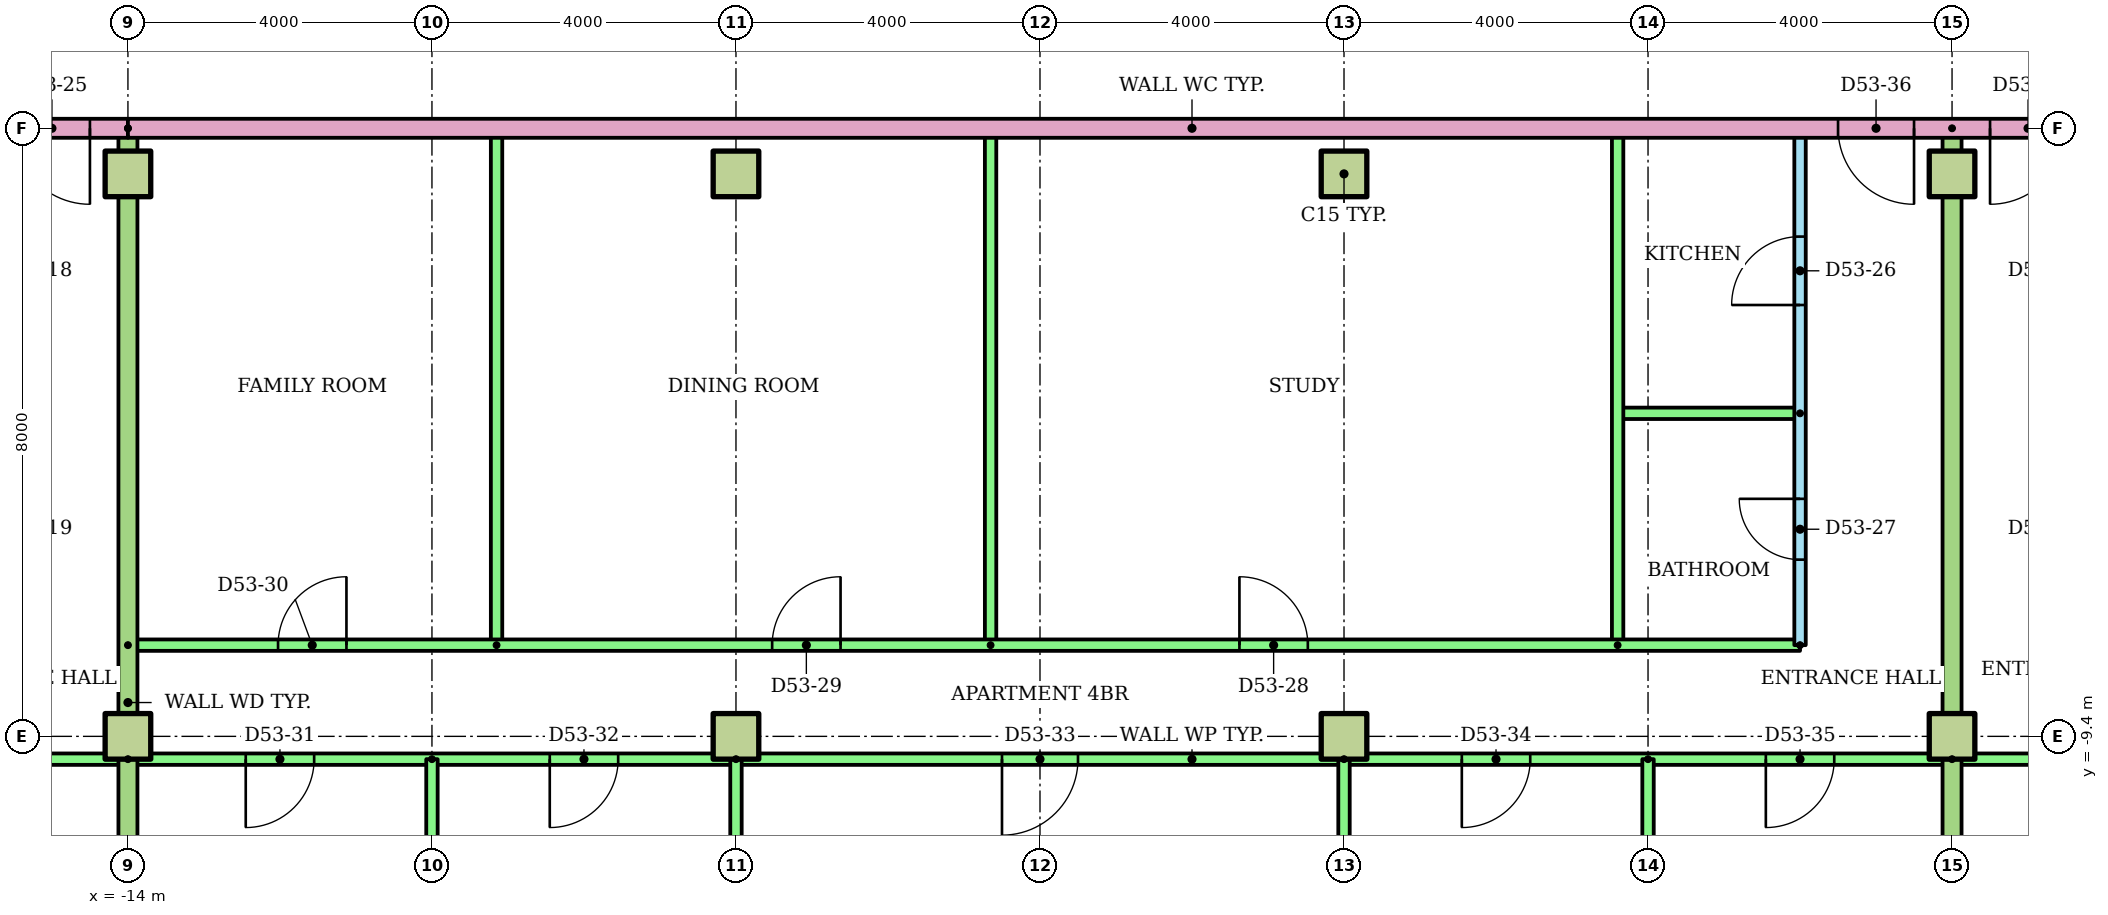
"""IFC4 building model, lengths in metres.
Left out: names, types, materials, properties, quantities, classifications, styles, units other than length and angle.
Written with IfcOpenShell. Run it as: python <this file> out.ifc"""

import sys

from ifc_helpers import new_model, si_unit, direction, frame, frame_2d, origin, origin_2d, place, context, subcontext, project, spatial, rectangle, extrude, element, fill, save


model = new_model("IFC4")
c1 = context("Model", 3, precision=1e-05, world=origin(), true_north=direction((0.0, 1.0)))
c2 = subcontext(c1, "Body", "Model", "MODEL_VIEW")
j1 = project(units=[si_unit("LENGTHUNIT", "METRE"), si_unit("PLANEANGLEUNIT", "RADIAN")], contexts=[c1])
p1 = place(None, origin())
s1 = spatial("IfcSite", under=j1, at=p1, CompositionType="ELEMENT")
p2 = place(p1, origin())
s2 = spatial("IfcBuilding", under=s1, at=p2, CompositionType="ELEMENT")
p3 = place(p2, frame((0.0, 0.0, 207.6)))
s3 = spatial("IfcBuildingStorey", under=s2, at=p3, CompositionType="ELEMENT", Elevation=207.6)
for number, where in (
    (1, (-14.0, -9.4, 0.0)),
    (2, (-6.0, -9.4, 0.0)),
    (3, (2.0, -9.4, 0.0)),
    (4, (10.0, -9.4, 0.0)),
    (5, (-14.0, -2.0, 0.0)),
    (6, (-6.0, -2.0, 0.0)),
    (7, (2.0, -2.0, 0.0)),
    (8, (10.0, -2.0, 0.0)),
):
    element("IfcColumn", number, at=place(p3, frame(where)), inside=s3, PredefinedType="COLUMN", context=c2, shape_type="SweptSolid", body=[
        extrude(rectangle(XDim=0.6, YDim=0.6, at=origin_2d()), origin(), (0.0, 0.0, 1.0), 3.2),
    ])
p4 = place(p3, frame((-14.0, -9.7, 0.0), z_axis=(0.0, 0.0, 1.0), x_axis=(-1.0, 0.0, 0.0)))
e9 = element("IfcWall", 9, at=p4, inside=s3, PredefinedType="PARTITIONING", context=c2, shape_type="SweptSolid", body=[
    extrude(rectangle(XDim=14.92, YDim=0.15, at=frame_2d((7.46, 0.0))), origin(), (0.0, 0.0, 1.0), 2.4),
])
p5 = place(p4, frame((12.0, 0.0, 0.0)))
e10 = element("IfcOpeningElement", 10, at=p5, cuts=e9, PredefinedType="OPENING", context=c2, shape_type="SweptSolid", body=[
    extrude(rectangle(XDim=0.9, YDim=2.1, at=frame_2d((0.45, 1.05))), frame((0.0, 0.085, 0.0), z_axis=(0.0, -1.0, 0.0), x_axis=(1.0, 0.0, 0.0)), (0.0, 0.0, 1.0), 0.17),
])
p6 = place(p4, frame((6.624, 0.0, 0.0)))
e11 = element("IfcOpeningElement", 11, at=p6, cuts=e9, PredefinedType="OPENING", context=c2, shape_type="SweptSolid", body=[
    extrude(rectangle(XDim=0.9, YDim=2.1, at=frame_2d((0.45, 1.05))), frame((0.0, 0.085, 0.0), z_axis=(0.0, -1.0, 0.0), x_axis=(1.0, 0.0, 0.0)), (0.0, 0.0, 1.0), 0.17),
])
p7 = place(p4, frame((1.5, 0.0, 0.0)))
e12 = element("IfcOpeningElement", 12, at=p7, cuts=e9, PredefinedType="OPENING", context=c2, shape_type="SweptSolid", body=[
    extrude(rectangle(XDim=1.0, YDim=2.1, at=frame_2d((0.5, 1.05))), frame((0.0, 0.085, 0.0), z_axis=(0.0, -1.0, 0.0), x_axis=(1.0, 0.0, 0.0)), (0.0, 0.0, 1.0), 0.17),
])
p8 = place(p3, frame((8.0, -8.2, 0.0), z_axis=(0.0, 0.0, 1.0), x_axis=(0.0, 1.0, 0.0)))
e13 = element("IfcWall", 13, at=p8, inside=s3, PredefinedType="PARTITIONING", context=c2, shape_type="SweptSolid", body=[
    extrude(rectangle(XDim=6.8, YDim=0.15, at=frame_2d((3.4, 0.0))), origin(), (0.0, 0.0, 1.0), 2.4),
])
p9 = place(p8, frame((4.475, 0.0, 0.0)))
e14 = element("IfcOpeningElement", 14, at=p9, cuts=e13, PredefinedType="OPENING", context=c2, shape_type="SweptSolid", body=[
    extrude(rectangle(XDim=0.9, YDim=2.1, at=frame_2d((0.45, 1.05))), frame((0.0, 0.085, 0.0), z_axis=(0.0, -1.0, 0.0), x_axis=(1.0, 0.0, 0.0)), (0.0, 0.0, 1.0), 0.17),
])
p10 = place(p8, frame((1.125, 0.0, 0.0)))
e15 = element("IfcOpeningElement", 15, at=p10, cuts=e13, PredefinedType="OPENING", context=c2, shape_type="SweptSolid", body=[
    extrude(rectangle(XDim=0.8, YDim=2.1, at=frame_2d((0.4, 1.05))), frame((0.0, 0.085, 0.0), z_axis=(0.0, -1.0, 0.0), x_axis=(1.0, 0.0, 0.0)), (0.0, 0.0, 1.0), 0.17),
])
p11 = place(p3, frame((8.0, -5.15, 0.0), z_axis=(0.0, 0.0, 1.0), x_axis=(-1.0, 0.0, 0.0)))
e16 = element("IfcWall", 16, at=p11, inside=s3, PredefinedType="PARTITIONING", context=c2, shape_type="SweptSolid", body=[
    extrude(rectangle(XDim=2.4, YDim=0.15, at=frame_2d((1.2, 0.0))), origin(), (0.0, 0.0, 1.0), 2.4),
])
for number, where, z_axis, x_axis in (
    (17, (5.6, -8.2, 0.0), (0.0, 0.0, 1.0), (0.0, 1.0, 0.0)),
    (18, (-2.65, -8.2, 0.0), (0.0, 0.0, 1.0), (0.0, 1.0, 0.0)),
    (19, (-9.15, -8.2, 0.0), (0.0, 0.0, 1.0), (0.0, 1.0, 0.0)),
):
    element("IfcWall", number, at=place(p3, frame(where, z_axis=z_axis, x_axis=x_axis)), inside=s3, PredefinedType="PARTITIONING", context=c2, shape_type="SweptSolid", body=[
        extrude(rectangle(XDim=6.8, YDim=0.15, at=frame_2d((3.4, 0.0))), origin(), (0.0, 0.0, 1.0), 2.4),
    ])
p12 = place(p3, frame((-14.0, -8.2, 0.0)))
e20 = element("IfcWall", 20, at=p12, inside=s3, PredefinedType="PARTITIONING", context=c2, shape_type="SweptSolid", body=[
    extrude(rectangle(XDim=22.0, YDim=0.15, at=frame_2d((11.0, 0.0))), origin(), (0.0, 0.0, 1.0), 2.4),
])
p13 = place(p12, frame((14.624, 0.0, 0.0)))
e21 = element("IfcOpeningElement", 21, at=p13, cuts=e20, PredefinedType="OPENING", context=c2, shape_type="SweptSolid", body=[
    extrude(rectangle(XDim=0.9, YDim=2.1, at=frame_2d((0.45, 1.05))), frame((0.0, 0.085, 0.0), z_axis=(0.0, -1.0, 0.0), x_axis=(1.0, 0.0, 0.0)), (0.0, 0.0, 1.0), 0.17),
])
p14 = place(p12, frame((8.476, 0.0, 0.0)))
e22 = element("IfcOpeningElement", 22, at=p14, cuts=e20, PredefinedType="OPENING", context=c2, shape_type="SweptSolid", body=[
    extrude(rectangle(XDim=0.9, YDim=2.1, at=frame_2d((0.45, 1.05))), frame((0.0, 0.085, 0.0), z_axis=(0.0, -1.0, 0.0), x_axis=(1.0, 0.0, 0.0)), (0.0, 0.0, 1.0), 0.17),
])
p15 = place(p12, frame((1.975, 0.0, 0.0)))
e23 = element("IfcOpeningElement", 23, at=p15, cuts=e20, PredefinedType="OPENING", context=c2, shape_type="SweptSolid", body=[
    extrude(rectangle(XDim=0.9, YDim=2.1, at=frame_2d((0.45, 1.05))), frame((0.0, 0.085, 0.0), z_axis=(0.0, -1.0, 0.0), x_axis=(1.0, 0.0, 0.0)), (0.0, 0.0, 1.0), 0.17),
])
p16 = place(p3, frame((10.0, -9.7, 0.0), z_axis=(0.0, 0.0, 1.0), x_axis=(-1.0, 0.0, 0.0)))
e24 = element("IfcWall", 24, at=p16, inside=s3, PredefinedType="PARTITIONING", context=c2, shape_type="SweptSolid", body=[
    extrude(rectangle(XDim=24.0, YDim=0.15, at=frame_2d((12.0, 0.0))), origin(), (0.0, 0.0, 1.0), 2.4),
])
p17 = place(p16, frame((21.55, 0.0, 0.0)))
e25 = element("IfcOpeningElement", 25, at=p17, cuts=e24, PredefinedType="OPENING", context=c2, shape_type="SweptSolid", body=[
    extrude(rectangle(XDim=0.9, YDim=2.1, at=frame_2d((0.45, 1.05))), frame((0.0, 0.085, 0.0), z_axis=(0.0, -1.0, 0.0), x_axis=(1.0, 0.0, 0.0)), (0.0, 0.0, 1.0), 0.17),
])
p18 = place(p16, frame((17.55, 0.0, 0.0)))
e26 = element("IfcOpeningElement", 26, at=p18, cuts=e24, PredefinedType="OPENING", context=c2, shape_type="SweptSolid", body=[
    extrude(rectangle(XDim=0.9, YDim=2.1, at=frame_2d((0.45, 1.05))), frame((0.0, 0.085, 0.0), z_axis=(0.0, -1.0, 0.0), x_axis=(1.0, 0.0, 0.0)), (0.0, 0.0, 1.0), 0.17),
])
p19 = place(p16, frame((11.5, 0.0, 0.0)))
e27 = element("IfcOpeningElement", 27, at=p19, cuts=e24, PredefinedType="OPENING", context=c2, shape_type="SweptSolid", body=[
    extrude(rectangle(XDim=1.0, YDim=2.1, at=frame_2d((0.5, 1.05))), frame((0.0, 0.085, 0.0), z_axis=(0.0, -1.0, 0.0), x_axis=(1.0, 0.0, 0.0)), (0.0, 0.0, 1.0), 0.17),
])
p20 = place(p16, frame((5.55, 0.0, 0.0)))
e28 = element("IfcOpeningElement", 28, at=p20, cuts=e24, PredefinedType="OPENING", context=c2, shape_type="SweptSolid", body=[
    extrude(rectangle(XDim=0.9, YDim=2.1, at=frame_2d((0.45, 1.05))), frame((0.0, 0.085, 0.0), z_axis=(0.0, -1.0, 0.0), x_axis=(1.0, 0.0, 0.0)), (0.0, 0.0, 1.0), 0.17),
])
p21 = place(p16, frame((1.55, 0.0, 0.0)))
e29 = element("IfcOpeningElement", 29, at=p21, cuts=e24, PredefinedType="OPENING", context=c2, shape_type="SweptSolid", body=[
    extrude(rectangle(XDim=0.9, YDim=2.1, at=frame_2d((0.45, 1.05))), frame((0.0, 0.085, 0.0), z_axis=(0.0, -1.0, 0.0), x_axis=(1.0, 0.0, 0.0)), (0.0, 0.0, 1.0), 0.17),
])
p22 = place(p3, frame((-10.0, -9.7, 0.0), z_axis=(0.0, 0.0, 1.0), x_axis=(0.0, -1.0, 0.0)))
e30 = element("IfcWall", 30, at=p22, inside=s3, PredefinedType="PARTITIONING", context=c2, shape_type="SweptSolid", body=[
    extrude(rectangle(XDim=6.821, YDim=0.15, at=frame_2d((3.411, 0.0))), origin(), (0.0, 0.0, 1.0), 2.4),
])
for number, where, z_axis, x_axis in (
    (31, (-6.0, -9.7, 0.0), (0.0, 0.0, 1.0), (0.0, -1.0, 0.0)),
    (32, (2.0, -9.7, 0.0), (0.0, 0.0, 1.0), (0.0, -1.0, 0.0)),
):
    element("IfcWall", number, at=place(p3, frame(where, z_axis=z_axis, x_axis=x_axis)), inside=s3, PredefinedType="PARTITIONING", context=c2, shape_type="SweptSolid", body=[
        extrude(rectangle(XDim=6.81, YDim=0.15, at=frame_2d((3.405, 0.0))), origin(), (0.0, 0.0, 1.0), 2.4),
    ])
p23 = place(p3, frame((6.0, -9.7, 0.0), z_axis=(0.0, 0.0, 1.0), x_axis=(0.0, -1.0, 0.0)))
e33 = element("IfcWall", 33, at=p23, inside=s3, PredefinedType="PARTITIONING", context=c2, shape_type="SweptSolid", body=[
    extrude(rectangle(XDim=6.821, YDim=0.15, at=frame_2d((3.411, 0.0))), origin(), (0.0, 0.0, 1.0), 2.4),
])
p24 = place(p3, frame((-14.0, -1.4, 0.0), z_axis=(0.0, 0.0, 1.0), x_axis=(0.0, -1.0, 0.0)))
e34 = element("IfcWall", 34, at=p24, inside=s3, PredefinedType="PARTITIONING", context=c2, shape_type="SweptSolid", body=[
    extrude(rectangle(XDim=15.11, YDim=0.25, at=frame_2d((7.555, 0.0))), origin(), (0.0, 0.0, 1.0), 2.4),
])
p25 = place(p3, frame((18.0, -9.7, 0.0), z_axis=(0.0, 0.0, 1.0), x_axis=(-1.0, 0.0, 0.0)))
e35 = element("IfcWall", 35, at=p25, inside=s3, PredefinedType="PARTITIONING", context=c2, shape_type="SweptSolid", body=[
    extrude(rectangle(XDim=8.0, YDim=0.15, at=frame_2d((4.0, 0.0))), origin(), (0.0, 0.0, 1.0), 2.4),
])
p26 = place(p25, frame((5.55, 0.0, 0.0)))
e36 = element("IfcOpeningElement", 36, at=p26, cuts=e35, PredefinedType="OPENING", context=c2, shape_type="SweptSolid", body=[
    extrude(rectangle(XDim=0.9, YDim=2.1, at=frame_2d((0.45, 1.05))), frame((0.0, 0.085, 0.0), z_axis=(0.0, -1.0, 0.0), x_axis=(1.0, 0.0, 0.0)), (0.0, 0.0, 1.0), 0.17),
])
p27 = place(p25, frame((1.5, 0.0, 0.0)))
e37 = element("IfcOpeningElement", 37, at=p27, cuts=e35, PredefinedType="OPENING", context=c2, shape_type="SweptSolid", body=[
    extrude(rectangle(XDim=1.0, YDim=2.1, at=frame_2d((0.5, 1.05))), frame((0.0, 0.085, 0.0), z_axis=(0.0, -1.0, 0.0), x_axis=(1.0, 0.0, 0.0)), (0.0, 0.0, 1.0), 0.17),
])
p28 = place(p3, frame((10.0, -1.4, 0.0), z_axis=(0.0, 0.0, 1.0), x_axis=(0.0, -1.0, 0.0)))
e38 = element("IfcWall", 38, at=p28, inside=s3, PredefinedType="PARTITIONING", context=c2, shape_type="SweptSolid", body=[
    extrude(rectangle(XDim=15.11, YDim=0.25, at=frame_2d((7.555, 0.0))), origin(), (0.0, 0.0, 1.0), 2.4),
])
p29 = place(p3, frame((-14.0, -1.4, 0.0), z_axis=(0.0, 0.0, 1.0), x_axis=(-1.0, 0.0, 0.0)))
e39 = element("IfcWall", 39, at=p29, inside=s3, PredefinedType="PARTITIONING", context=c2, shape_type="SweptSolid", body=[
    extrude(rectangle(XDim=14.92, YDim=0.25, at=frame_2d((7.46, 0.0))), origin(), (0.0, 0.0, 1.0), 2.4),
])
p30 = place(p29, frame((0.5, 0.0, 0.0)))
e40 = element("IfcOpeningElement", 40, at=p30, cuts=e39, PredefinedType="OPENING", context=c2, shape_type="SweptSolid", body=[
    extrude(rectangle(XDim=1.0, YDim=2.1, at=frame_2d((0.5, 1.05))), frame((0.0, 0.135, 0.0), z_axis=(0.0, -1.0, 0.0), x_axis=(1.0, 0.0, 0.0)), (0.0, 0.0, 1.0), 0.27),
])
p31 = place(p3, frame((14.0, -1.4, 0.0), z_axis=(0.0, 0.0, 1.0), x_axis=(-1.0, 0.0, 0.0)))
e41 = element("IfcWall", 41, at=p31, inside=s3, PredefinedType="PARTITIONING", context=c2, shape_type="SweptSolid", body=[
    extrude(rectangle(XDim=28.0, YDim=0.25, at=frame_2d((14.0, 0.0))), origin(), (0.0, 0.0, 1.0), 2.4),
])
p32 = place(p31, frame((4.5, 0.0, 0.0)))
e42 = element("IfcOpeningElement", 42, at=p32, cuts=e41, PredefinedType="OPENING", context=c2, shape_type="SweptSolid", body=[
    extrude(rectangle(XDim=1.0, YDim=2.1, at=frame_2d((0.5, 1.05))), frame((0.0, 0.135, 0.0), z_axis=(0.0, -1.0, 0.0), x_axis=(1.0, 0.0, 0.0)), (0.0, 0.0, 1.0), 0.27),
])
p33 = place(p31, frame((2.5, 0.0, 0.0)))
e43 = element("IfcOpeningElement", 43, at=p33, cuts=e41, PredefinedType="OPENING", context=c2, shape_type="SweptSolid", body=[
    extrude(rectangle(XDim=1.0, YDim=2.1, at=frame_2d((0.5, 1.05))), frame((0.0, 0.135, 0.0), z_axis=(0.0, -1.0, 0.0), x_axis=(1.0, 0.0, 0.0)), (0.0, 0.0, 1.0), 0.27),
])
p34 = place(p30, origin())
e44 = element("IfcDoor", 44, at=p34, inside=s3, OperationType="SINGLE_SWING_LEFT", PredefinedType="DOOR", context=c2, shape_type="SweptSolid", body=[
    extrude(rectangle(XDim=1.0, YDim=2.1, at=frame_2d((0.5, 1.05))), frame((0.0, 0.025, 0.0), z_axis=(0.0, -1.0, 0.0), x_axis=(1.0, 0.0, 0.0)), (0.0, 0.0, 1.0), 0.05),
])
fill(e40, e44)
p35 = place(p9, origin())
e45 = element("IfcDoor", 45, at=p35, inside=s3, OperationType="SINGLE_SWING_LEFT", PredefinedType="DOOR", context=c2, shape_type="SweptSolid", body=[
    extrude(rectangle(XDim=0.9, YDim=2.1, at=frame_2d((0.45, 1.05))), frame((0.0, 0.025, 0.0), z_axis=(0.0, -1.0, 0.0), x_axis=(1.0, 0.0, 0.0)), (0.0, 0.0, 1.0), 0.05),
])
fill(e14, e45)
p36 = place(p10, origin())
e46 = element("IfcDoor", 46, at=p36, inside=s3, OperationType="SINGLE_SWING_RIGHT", PredefinedType="DOOR", context=c2, shape_type="SweptSolid", body=[
    extrude(rectangle(XDim=0.8, YDim=2.1, at=frame_2d((0.4, 1.05))), frame((0.0, 0.025, 0.0), z_axis=(0.0, -1.0, 0.0), x_axis=(1.0, 0.0, 0.0)), (0.0, 0.0, 1.0), 0.05),
])
fill(e15, e46)
p37 = place(p13, origin())
e47 = element("IfcDoor", 47, at=p37, inside=s3, OperationType="SINGLE_SWING_LEFT", PredefinedType="DOOR", context=c2, shape_type="SweptSolid", body=[
    extrude(rectangle(XDim=0.9, YDim=2.1, at=frame_2d((0.45, 1.05))), frame((0.0, 0.025, 0.0), z_axis=(0.0, -1.0, 0.0), x_axis=(1.0, 0.0, 0.0)), (0.0, 0.0, 1.0), 0.05),
])
fill(e21, e47)
p38 = place(p14, origin())
e48 = element("IfcDoor", 48, at=p38, inside=s3, OperationType="SINGLE_SWING_RIGHT", PredefinedType="DOOR", context=c2, shape_type="SweptSolid", body=[
    extrude(rectangle(XDim=0.9, YDim=2.1, at=frame_2d((0.45, 1.05))), frame((0.0, 0.025, 0.0), z_axis=(0.0, -1.0, 0.0), x_axis=(1.0, 0.0, 0.0)), (0.0, 0.0, 1.0), 0.05),
])
fill(e22, e48)
p39 = place(p15, origin())
e49 = element("IfcDoor", 49, at=p39, inside=s3, OperationType="SINGLE_SWING_RIGHT", PredefinedType="DOOR", context=c2, shape_type="SweptSolid", body=[
    extrude(rectangle(XDim=0.9, YDim=2.1, at=frame_2d((0.45, 1.05))), frame((0.0, 0.025, 0.0), z_axis=(0.0, -1.0, 0.0), x_axis=(1.0, 0.0, 0.0)), (0.0, 0.0, 1.0), 0.05),
])
fill(e23, e49)
p40 = place(p17, origin())
e50 = element("IfcDoor", 50, at=p40, inside=s3, OperationType="SINGLE_SWING_RIGHT", PredefinedType="DOOR", context=c2, shape_type="SweptSolid", body=[
    extrude(rectangle(XDim=0.9, YDim=2.1, at=frame_2d((0.45, 1.05))), frame((0.0, 0.025, 0.0), z_axis=(0.0, -1.0, 0.0), x_axis=(1.0, 0.0, 0.0)), (0.0, 0.0, 1.0), 0.05),
])
fill(e25, e50)
p41 = place(p18, origin())
e51 = element("IfcDoor", 51, at=p41, inside=s3, OperationType="SINGLE_SWING_RIGHT", PredefinedType="DOOR", context=c2, shape_type="SweptSolid", body=[
    extrude(rectangle(XDim=0.9, YDim=2.1, at=frame_2d((0.45, 1.05))), frame((0.0, 0.025, 0.0), z_axis=(0.0, -1.0, 0.0), x_axis=(1.0, 0.0, 0.0)), (0.0, 0.0, 1.0), 0.05),
])
fill(e26, e51)
p42 = place(p19, origin())
e52 = element("IfcDoor", 52, at=p42, inside=s3, OperationType="SINGLE_SWING_RIGHT", PredefinedType="DOOR", context=c2, shape_type="SweptSolid", body=[
    extrude(rectangle(XDim=1.0, YDim=2.1, at=frame_2d((0.5, 1.05))), frame((0.0, 0.025, 0.0), z_axis=(0.0, -1.0, 0.0), x_axis=(1.0, 0.0, 0.0)), (0.0, 0.0, 1.0), 0.05),
])
fill(e27, e52)
p43 = place(p20, origin())
e53 = element("IfcDoor", 53, at=p43, inside=s3, OperationType="SINGLE_SWING_RIGHT", PredefinedType="DOOR", context=c2, shape_type="SweptSolid", body=[
    extrude(rectangle(XDim=0.9, YDim=2.1, at=frame_2d((0.45, 1.05))), frame((0.0, 0.025, 0.0), z_axis=(0.0, -1.0, 0.0), x_axis=(1.0, 0.0, 0.0)), (0.0, 0.0, 1.0), 0.05),
])
fill(e28, e53)
p44 = place(p21, origin())
e54 = element("IfcDoor", 54, at=p44, inside=s3, OperationType="SINGLE_SWING_RIGHT", PredefinedType="DOOR", context=c2, shape_type="SweptSolid", body=[
    extrude(rectangle(XDim=0.9, YDim=2.1, at=frame_2d((0.45, 1.05))), frame((0.0, 0.025, 0.0), z_axis=(0.0, -1.0, 0.0), x_axis=(1.0, 0.0, 0.0)), (0.0, 0.0, 1.0), 0.05),
])
fill(e29, e54)
p45 = place(p32, origin())
e55 = element("IfcDoor", 55, at=p45, inside=s3, OperationType="SINGLE_SWING_LEFT", PredefinedType="DOOR", context=c2, shape_type="SweptSolid", body=[
    extrude(rectangle(XDim=1.0, YDim=2.1, at=frame_2d((0.5, 1.05))), frame((0.0, 0.025, 0.0), z_axis=(0.0, -1.0, 0.0), x_axis=(1.0, 0.0, 0.0)), (0.0, 0.0, 1.0), 0.05),
])
fill(e42, e55)
p46 = place(p33, origin())
e56 = element("IfcDoor", 56, at=p46, inside=s3, OperationType="SINGLE_SWING_RIGHT", PredefinedType="DOOR", context=c2, shape_type="SweptSolid", body=[
    extrude(rectangle(XDim=1.0, YDim=2.1, at=frame_2d((0.5, 1.05))), frame((0.0, 0.025, 0.0), z_axis=(0.0, -1.0, 0.0), x_axis=(1.0, 0.0, 0.0)), (0.0, 0.0, 1.0), 0.05),
])
fill(e43, e56)
save(model, sys.argv[1])
